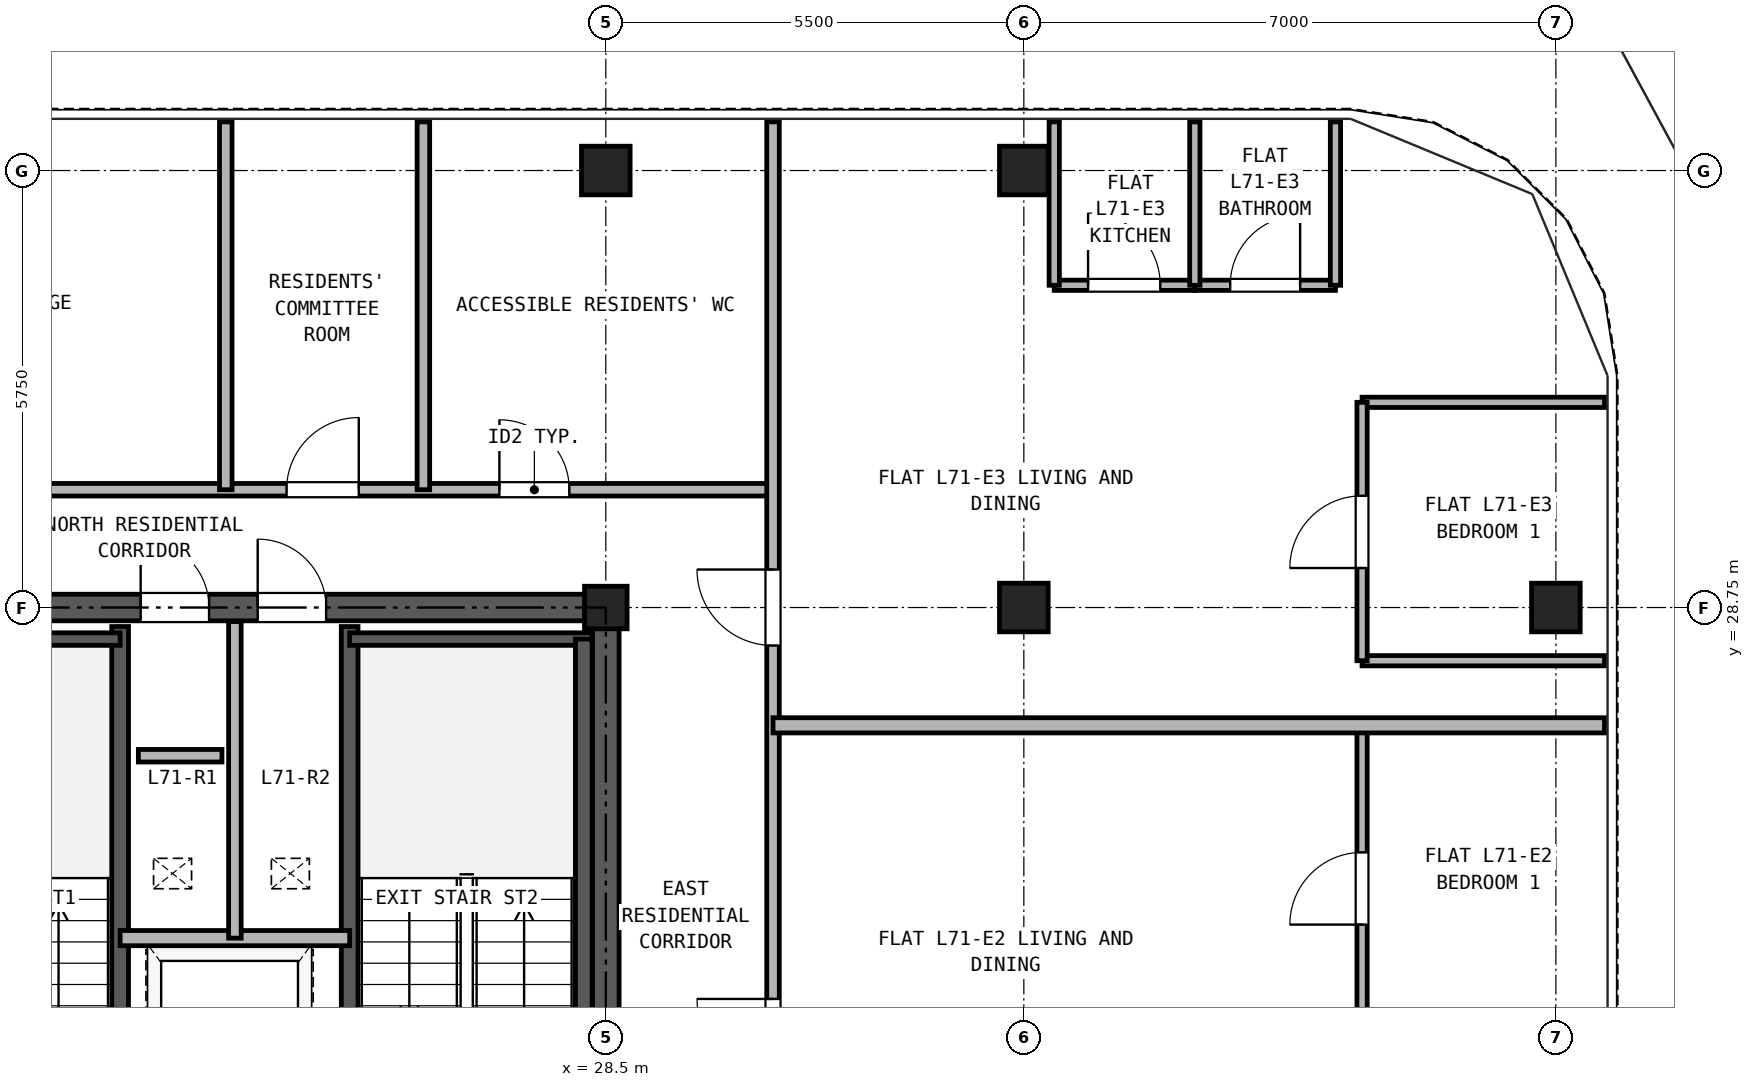
"""IFC4 building model, lengths in metres.
Left out: names, types, materials, properties, quantities, classifications, styles, units other than length and angle.
Written with IfcOpenShell. Run it as: python <this file> out.ifc"""

import sys

from ifc_helpers import new_model, si_unit, direction, frame, frame_2d, origin, origin_2d, place, context, subcontext, project, spatial, rectangle, hollow_rectangle, extrude, source, transform, mapped, element, fill, save


model = new_model("IFC4")
c1 = context("Model", 3, precision=1e-05, world=origin(), true_north=direction((0.0, 1.0)))
c2 = subcontext(c1, "Body", "Model", "MODEL_VIEW")
j1 = project(units=[si_unit("LENGTHUNIT", "METRE"), si_unit("PLANEANGLEUNIT", "RADIAN")], contexts=[c1])
p1 = place(None, origin())
s1 = spatial("IfcSite", under=j1, at=p1, CompositionType="ELEMENT")
p2 = place(p1, origin())
s2 = spatial("IfcBuilding", under=s1, at=p2, CompositionType="ELEMENT")
p3 = place(p2, frame((0.0, 0.0, 248.9)))
s3 = spatial("IfcBuildingStorey", under=s2, at=p3, CompositionType="ELEMENT", Elevation=248.9)
m1 = source(origin(), c2, "Body", "SweptSolid", [
    extrude(hollow_rectangle(XDim=0.64, YDim=0.64, WallThickness=0.035, at=origin_2d()), origin(), (0.0, 0.0, 1.0), 2.98),
])
for number, where, z_axis, x_axis in (
    (1, (28.5, 34.5, 0.0), (0.0, 0.0, 1.0), (1.0, 0.0, 0.0)),
    (2, (34.0, 34.5, 0.0), (0.0, 0.0, 1.0), (1.0, 0.0, 0.0)),
    (3, (41.0, 28.75, 0.0), (0.0, 0.0, 1.0), (1.0, 0.0, 0.0)),
):
    element("IfcColumn", number, at=place(p3, frame(where, z_axis=z_axis, x_axis=x_axis)), inside=s3, PredefinedType="COLUMN", context=c2, shape_type="MappedRepresentation", body=[
        mapped(m1, transform((0.0, 0.0, 0.0), x_axis=(1.0, 0.0, 0.0), y_axis=(0.0, 1.0, 0.0), z_axis=(0.0, 0.0, 1.0), scale=1.0)),
    ])
m2 = source(origin(), c2, "Body", "SweptSolid", [
    extrude(hollow_rectangle(XDim=0.56, YDim=0.56, WallThickness=0.03, at=origin_2d()), origin(), (0.0, 0.0, 1.0), 2.98),
])
p4 = place(p3, frame((28.5, 28.75, 0.0), z_axis=(0.0, 0.0, 1.0), x_axis=(1.0, 0.0, 0.0)))
e4 = element("IfcColumn", 4, at=p4, inside=s3, PredefinedType="COLUMN", context=c2, shape_type="MappedRepresentation", body=[
    mapped(m2, transform((0.0, 0.0, 0.0), x_axis=(1.0, 0.0, 0.0), y_axis=(0.0, 1.0, 0.0), z_axis=(0.0, 0.0, 1.0), scale=1.0)),
])
p5 = place(p3, frame((34.0, 28.75, 0.0), z_axis=(0.0, 0.0, 1.0), x_axis=(1.0, 0.0, 0.0)))
e5 = element("IfcColumn", 5, at=p5, inside=s3, PredefinedType="COLUMN", context=c2, shape_type="MappedRepresentation", body=[
    mapped(m1, transform((0.0, 0.0, 0.0), x_axis=(1.0, 0.0, 0.0), y_axis=(0.0, 1.0, 0.0), z_axis=(0.0, 0.0, 1.0), scale=1.0)),
])
p6 = place(p3, frame((18.325, 28.75, 0.0), z_axis=(0.0, 0.0, 1.0), x_axis=(1.0, 0.0, 0.0)))
e6 = element("IfcWall", 6, at=p6, inside=s3, PredefinedType="SHEAR", context=c2, shape_type="SweptSolid", body=[
    extrude(rectangle(XDim=10.35, YDim=0.35, at=frame_2d((5.175, 0.0))), origin(), (0.0, 0.0, 1.0), 2.98),
])
p7 = place(p6, frame((4.055, 0.0, 0.0)))
e7 = element("IfcOpeningElement", 7, at=p7, cuts=e6, PredefinedType="OPENING", context=c2, shape_type="SweptSolid", body=[
    extrude(rectangle(XDim=0.9, YDim=2.05, at=frame_2d((0.45, 1.025))), frame((0.0, 0.185, 0.0), z_axis=(0.0, -1.0, 0.0), x_axis=(1.0, 0.0, 0.0)), (0.0, 0.0, 1.0), 0.37),
])
p8 = place(p6, frame((5.595, 0.0, 0.0)))
e8 = element("IfcOpeningElement", 8, at=p8, cuts=e6, PredefinedType="OPENING", context=c2, shape_type="SweptSolid", body=[
    extrude(rectangle(XDim=0.9, YDim=2.05, at=frame_2d((0.45, 1.025))), frame((0.0, 0.185, 0.0), z_axis=(0.0, -1.0, 0.0), x_axis=(1.0, 0.0, 0.0)), (0.0, 0.0, 1.0), 0.37),
])
p9 = place(p3, frame((28.5, 11.675, 0.0), z_axis=(0.0, 0.0, 1.0), x_axis=(0.0, 1.0, 0.0)))
e9 = element("IfcWall", 9, at=p9, inside=s3, PredefinedType="SHEAR", context=c2, shape_type="SweptSolid", body=[
    extrude(rectangle(XDim=16.9, YDim=0.35, at=frame_2d((8.45, 0.0))), origin(), (0.0, 0.0, 1.0), 2.98),
])
p10 = place(p9, frame((7.475, 0.0, 0.0)))
e10 = element("IfcOpeningElement", 10, at=p10, cuts=e9, PredefinedType="OPENING", context=c2, shape_type="SweptSolid", body=[
    extrude(rectangle(XDim=1.15, YDim=2.2, at=frame_2d((0.575, 1.1))), frame((0.0, 0.185, 0.0), z_axis=(0.0, -1.0, 0.0), x_axis=(1.0, 0.0, 0.0)), (0.0, 0.0, 1.0), 0.37),
])
for number, where, z_axis, x_axis in (
    (11, (22.11, 21.39, 0.0), (0.0, 0.0, 1.0), (0.0, 1.0, 0.0)),
    (12, (25.13, 21.39, 0.0), (0.0, 0.0, 1.0), (0.0, 1.0, 0.0)),
):
    element("IfcWall", number, at=place(p3, frame(where, z_axis=z_axis, x_axis=x_axis)), inside=s3, PredefinedType="SOLIDWALL", context=c2, shape_type="SweptSolid", body=[
        extrude(rectangle(XDim=7.11, YDim=0.22, at=frame_2d((3.555, 0.0))), origin(), (0.0, 0.0, 1.0), 2.98),
    ])
p11 = place(p3, frame((18.685, 28.335, 0.0), z_axis=(0.0, 0.0, 1.0), x_axis=(1.0, 0.0, 0.0)))
e13 = element("IfcWall", 13, at=p11, inside=s3, PredefinedType="PARTITIONING", context=c2, shape_type="SweptSolid", body=[
    extrude(rectangle(XDim=3.425, YDim=0.165, at=frame_2d((1.712, 0.0))), origin(), (0.0, 0.0, 1.0), 2.98),
])
p12 = place(p3, frame((25.13, 28.335, 0.0), z_axis=(0.0, 0.0, 1.0), x_axis=(1.0, 0.0, 0.0)))
e14 = element("IfcWall", 14, at=p12, inside=s3, PredefinedType="PARTITIONING", context=c2, shape_type="SweptSolid", body=[
    extrude(rectangle(XDim=3.185, YDim=0.165, at=frame_2d((1.593, 0.0))), origin(), (0.0, 0.0, 1.0), 2.98),
])
p13 = place(p3, frame((28.21, 21.39, 0.0), z_axis=(0.0, 0.0, 1.0), x_axis=(0.0, 1.0, 0.0)))
e15 = element("IfcWall", 15, at=p13, inside=s3, PredefinedType="SOLIDWALL", context=c2, shape_type="SweptSolid", body=[
    extrude(rectangle(XDim=6.945, YDim=0.22, at=frame_2d((3.473, 0.0))), origin(), (0.0, 0.0, 1.0), 2.98),
])
p14 = place(p3, frame((22.11, 24.4, 0.0), z_axis=(0.0, 0.0, 1.0), x_axis=(1.0, 0.0, 0.0)))
e16 = element("IfcWall", 16, at=p14, inside=s3, PredefinedType="PARTITIONING", context=c2, shape_type="SweptSolid", body=[
    extrude(rectangle(XDim=3.02, YDim=0.2, at=frame_2d((1.51, 0.0))), origin(), (0.0, 0.0, 1.0), 2.98),
])
p15 = place(p3, frame((23.62, 24.4, 0.0), z_axis=(0.0, 0.0, 1.0), x_axis=(0.0, 1.0, 0.0)))
e17 = element("IfcWall", 17, at=p15, inside=s3, PredefinedType="PARTITIONING", context=c2, shape_type="SweptSolid", body=[
    extrude(rectangle(XDim=4.165, YDim=0.165, at=frame_2d((2.083, 0.0))), origin(), (0.0, 0.0, 1.0), 2.98),
])
p16 = place(p3, frame((16.3, 30.3, 0.0), z_axis=(0.0, 0.0, 1.0), x_axis=(1.0, 0.0, 0.0)))
e18 = element("IfcWall", 18, at=p16, inside=s3, PredefinedType="PARTITIONING", context=c2, shape_type="SweptSolid", body=[
    extrude(rectangle(XDim=14.4, YDim=0.165, at=frame_2d((7.2, 0.0))), origin(), (0.0, 0.0, 1.0), 2.98),
])
p17 = place(p16, frame((3.1, 0.0, 0.0)))
e19 = element("IfcOpeningElement", 19, at=p17, cuts=e18, PredefinedType="OPENING", context=c2, shape_type="SweptSolid", body=[
    extrude(rectangle(XDim=0.95, YDim=2.15, at=frame_2d((0.475, 1.075))), frame((0.0, 0.093, 0.0), z_axis=(0.0, -1.0, 0.0), x_axis=(1.0, 0.0, 0.0)), (0.0, 0.0, 1.0), 0.185),
])
p18 = place(p16, frame((8.0, 0.0, 0.0)))
e20 = element("IfcOpeningElement", 20, at=p18, cuts=e18, PredefinedType="OPENING", context=c2, shape_type="SweptSolid", body=[
    extrude(rectangle(XDim=0.95, YDim=2.15, at=frame_2d((0.475, 1.075))), frame((0.0, 0.093, 0.0), z_axis=(0.0, -1.0, 0.0), x_axis=(1.0, 0.0, 0.0)), (0.0, 0.0, 1.0), 0.185),
])
p19 = place(p16, frame((10.8, 0.0, 0.0)))
e21 = element("IfcOpeningElement", 21, at=p19, cuts=e18, PredefinedType="OPENING", context=c2, shape_type="SweptSolid", body=[
    extrude(rectangle(XDim=0.92, YDim=2.1, at=frame_2d((0.46, 1.05))), frame((0.0, 0.093, 0.0), z_axis=(0.0, -1.0, 0.0), x_axis=(1.0, 0.0, 0.0)), (0.0, 0.0, 1.0), 0.185),
])
p20 = place(p3, frame((30.7, 11.2, 0.0), z_axis=(0.0, 0.0, 1.0), x_axis=(0.0, 1.0, 0.0)))
e22 = element("IfcWall", 22, at=p20, inside=s3, PredefinedType="PARTITIONING", context=c2, shape_type="SweptSolid", body=[
    extrude(rectangle(XDim=23.94, YDim=0.165, at=frame_2d((11.97, 0.0))), origin(), (0.0, 0.0, 1.0), 2.98),
])
p21 = place(p20, frame((3.4, 0.0, 0.0)))
e23 = element("IfcOpeningElement", 23, at=p21, cuts=e22, PredefinedType="OPENING", context=c2, shape_type="SweptSolid", body=[
    extrude(rectangle(XDim=1.0, YDim=2.15, at=frame_2d((0.5, 1.075))), frame((0.0, 0.093, 0.0), z_axis=(0.0, -1.0, 0.0), x_axis=(1.0, 0.0, 0.0)), (0.0, 0.0, 1.0), 0.185),
])
p22 = place(p20, frame((11.4, 0.0, 0.0)))
e24 = element("IfcOpeningElement", 24, at=p22, cuts=e22, PredefinedType="OPENING", context=c2, shape_type="SweptSolid", body=[
    extrude(rectangle(XDim=1.0, YDim=2.15, at=frame_2d((0.5, 1.075))), frame((0.0, 0.093, 0.0), z_axis=(0.0, -1.0, 0.0), x_axis=(1.0, 0.0, 0.0)), (0.0, 0.0, 1.0), 0.185),
])
p23 = place(p20, frame((17.05, 0.0, 0.0)))
e25 = element("IfcOpeningElement", 25, at=p23, cuts=e22, PredefinedType="OPENING", context=c2, shape_type="SweptSolid", body=[
    extrude(rectangle(XDim=1.0, YDim=2.15, at=frame_2d((0.5, 1.075))), frame((0.0, 0.093, 0.0), z_axis=(0.0, -1.0, 0.0), x_axis=(1.0, 0.0, 0.0)), (0.0, 0.0, 1.0), 0.185),
])
p24 = place(p3, frame((38.45, 22.916, 0.0), z_axis=(0.0, 0.0, 1.0), x_axis=(0.0, 1.0, 0.0)))
e26 = element("IfcWall", 26, at=p24, inside=s3, PredefinedType="PARTITIONING", context=c2, shape_type="SweptSolid", body=[
    extrude(rectangle(XDim=4.284, YDim=0.135, at=frame_2d((2.142, 0.0))), origin(), (0.0, 0.0, 1.0), 2.98),
])
p25 = place(p24, frame((1.662, 0.0, 0.0)))
e27 = element("IfcOpeningElement", 27, at=p25, cuts=e26, PredefinedType="OPENING", context=c2, shape_type="SweptSolid", body=[
    extrude(rectangle(XDim=0.95, YDim=2.15, at=frame_2d((0.475, 1.075))), frame((0.0, 0.077, 0.0), z_axis=(0.0, -1.0, 0.0), x_axis=(1.0, 0.0, 0.0)), (0.0, 0.0, 1.0), 0.155),
])
p26 = place(p3, frame((30.7, 27.2, 0.0), z_axis=(0.0, 0.0, 1.0), x_axis=(1.0, 0.0, 0.0)))
e28 = element("IfcWall", 28, at=p26, inside=s3, PredefinedType="PARTITIONING", context=c2, shape_type="SweptSolid", body=[
    extrude(rectangle(XDim=10.94, YDim=0.2, at=frame_2d((5.47, 0.0))), origin(), (0.0, 0.0, 1.0), 2.98),
])
p27 = place(p3, frame((34.4, 32.99, 0.0), z_axis=(0.0, 0.0, 1.0), x_axis=(1.0, 0.0, 0.0)))
e29 = element("IfcWall", 29, at=p27, inside=s3, PredefinedType="PARTITIONING", context=c2, shape_type="SweptSolid", body=[
    extrude(rectangle(XDim=1.85, YDim=0.135, at=frame_2d((0.925, 0.0))), origin(), (0.0, 0.0, 1.0), 2.98),
])
p28 = place(p27, frame((0.445, 0.0, 0.0)))
e30 = element("IfcOpeningElement", 30, at=p28, cuts=e29, PredefinedType="OPENING", context=c2, shape_type="SweptSolid", body=[
    extrude(rectangle(XDim=0.95, YDim=2.15, at=frame_2d((0.475, 1.075))), frame((0.0, 0.077, 0.0), z_axis=(0.0, -1.0, 0.0), x_axis=(1.0, 0.0, 0.0)), (0.0, 0.0, 1.0), 0.155),
])
p29 = place(p3, frame((36.25, 32.99, 0.0), z_axis=(0.0, 0.0, 1.0), x_axis=(1.0, 0.0, 0.0)))
e31 = element("IfcWall", 31, at=p29, inside=s3, PredefinedType="PARTITIONING", context=c2, shape_type="SweptSolid", body=[
    extrude(rectangle(XDim=1.85, YDim=0.135, at=frame_2d((0.925, 0.0))), origin(), (0.0, 0.0, 1.0), 2.98),
])
p30 = place(p29, frame((0.465, 0.0, 0.0)))
e32 = element("IfcOpeningElement", 32, at=p30, cuts=e31, PredefinedType="OPENING", context=c2, shape_type="SweptSolid", body=[
    extrude(rectangle(XDim=0.92, YDim=2.1, at=frame_2d((0.46, 1.05))), frame((0.0, 0.077, 0.0), z_axis=(0.0, -1.0, 0.0), x_axis=(1.0, 0.0, 0.0)), (0.0, 0.0, 1.0), 0.155),
])
for number, where, z_axis, x_axis in (
    (33, (34.4, 32.99, 0.0), (0.0, 0.0, 1.0), (0.0, 1.0, 0.0)),
    (34, (36.25, 32.99, 0.0), (0.0, 0.0, 1.0), (0.0, 1.0, 0.0)),
    (35, (38.1, 32.99, 0.0), (0.0, 0.0, 1.0), (0.0, 1.0, 0.0)),
):
    element("IfcWall", number, at=place(p3, frame(where, z_axis=z_axis, x_axis=x_axis)), inside=s3, PredefinedType="PARTITIONING", context=c2, shape_type="SweptSolid", body=[
        extrude(rectangle(XDim=2.15, YDim=0.135, at=frame_2d((1.075, 0.0))), origin(), (0.0, 0.0, 1.0), 2.98),
    ])
for number, where, z_axis, x_axis in (
    (36, (38.45, 28.05, 0.0), (0.0, 0.0, 1.0), (1.0, 0.0, 0.0)),
    (37, (38.45, 31.45, 0.0), (0.0, 0.0, 1.0), (1.0, 0.0, 0.0)),
):
    element("IfcWall", number, at=place(p3, frame(where, z_axis=z_axis, x_axis=x_axis)), inside=s3, PredefinedType="PARTITIONING", context=c2, shape_type="SweptSolid", body=[
        extrude(rectangle(XDim=3.19, YDim=0.135, at=frame_2d((1.595, 0.0))), origin(), (0.0, 0.0, 1.0), 2.98),
    ])
p31 = place(p3, frame((38.45, 28.05, 0.0), z_axis=(0.0, 0.0, 1.0), x_axis=(0.0, 1.0, 0.0)))
e38 = element("IfcWall", 38, at=p31, inside=s3, PredefinedType="PARTITIONING", context=c2, shape_type="SweptSolid", body=[
    extrude(rectangle(XDim=3.4, YDim=0.135, at=frame_2d((1.7, 0.0))), origin(), (0.0, 0.0, 1.0), 2.98),
])
p32 = place(p31, frame((1.22, 0.0, 0.0)))
e39 = element("IfcOpeningElement", 39, at=p32, cuts=e38, PredefinedType="OPENING", context=c2, shape_type="SweptSolid", body=[
    extrude(rectangle(XDim=0.95, YDim=2.15, at=frame_2d((0.475, 1.075))), frame((0.0, 0.077, 0.0), z_axis=(0.0, -1.0, 0.0), x_axis=(1.0, 0.0, 0.0)), (0.0, 0.0, 1.0), 0.155),
])
for number, where, z_axis, x_axis in (
    (40, (23.5, 30.3, 0.0), (0.0, 0.0, 1.0), (0.0, 1.0, 0.0)),
    (41, (26.1, 30.3, 0.0), (0.0, 0.0, 1.0), (0.0, 1.0, 0.0)),
):
    element("IfcWall", number, at=place(p3, frame(where, z_axis=z_axis, x_axis=x_axis)), inside=s3, PredefinedType="PARTITIONING", context=c2, shape_type="SweptSolid", body=[
        extrude(rectangle(XDim=4.84, YDim=0.165, at=frame_2d((2.42, 0.0))), origin(), (0.0, 0.0, 1.0), 2.98),
    ])
p33 = place(p3, frame((22.35, 26.8, 0.0), z_axis=(0.0, 0.0, 1.0), x_axis=(1.0, 0.0, 0.0)))
e42 = element("IfcWall", 42, at=p33, inside=s3, PredefinedType="PARTITIONING", context=c2, shape_type="SweptSolid", body=[
    extrude(rectangle(XDim=1.1, YDim=0.165, at=frame_2d((0.55, 0.0))), origin(), (0.0, 0.0, 1.0), 2.98),
])
p34 = place(p7, origin())
e43 = element("IfcDoor", 43, at=p34, inside=s3, OperationType="SINGLE_SWING_LEFT", PredefinedType="DOOR", context=c2, shape_type="SweptSolid", body=[
    extrude(rectangle(XDim=0.9, YDim=2.05, at=frame_2d((0.45, 1.025))), frame((0.0, 0.025, 0.0), z_axis=(0.0, -1.0, 0.0), x_axis=(1.0, 0.0, 0.0)), (0.0, 0.0, 1.0), 0.05),
])
fill(e7, e43)
p35 = place(p8, origin())
e44 = element("IfcDoor", 44, at=p35, inside=s3, OperationType="SINGLE_SWING_LEFT", PredefinedType="DOOR", context=c2, shape_type="SweptSolid", body=[
    extrude(rectangle(XDim=0.9, YDim=2.05, at=frame_2d((0.45, 1.025))), frame((0.0, 0.025, 0.0), z_axis=(0.0, -1.0, 0.0), x_axis=(1.0, 0.0, 0.0)), (0.0, 0.0, 1.0), 0.05),
])
fill(e8, e44)
p36 = place(p25, frame((0.95, 0.0, 0.0), z_axis=(0.0, 0.0, 1.0), x_axis=(-1.0, 0.0, 0.0)))
e45 = element("IfcDoor", 45, at=p36, inside=s3, OperationType="SINGLE_SWING_LEFT", PredefinedType="DOOR", context=c2, shape_type="SweptSolid", body=[
    extrude(rectangle(XDim=0.95, YDim=2.15, at=frame_2d((0.475, 1.075))), frame((0.0, 0.025, 0.0), z_axis=(0.0, -1.0, 0.0), x_axis=(1.0, 0.0, 0.0)), (0.0, 0.0, 1.0), 0.05),
])
fill(e27, e45)
p37 = place(p22, frame((1.0, 0.0, 0.0), z_axis=(0.0, 0.0, 1.0), x_axis=(-1.0, 0.0, 0.0)))
e46 = element("IfcDoor", 46, at=p37, inside=s3, OperationType="SINGLE_SWING_RIGHT", PredefinedType="DOOR", context=c2, shape_type="SweptSolid", body=[
    extrude(rectangle(XDim=1.0, YDim=2.15, at=frame_2d((0.5, 1.075))), frame((0.0, 0.025, 0.0), z_axis=(0.0, -1.0, 0.0), x_axis=(1.0, 0.0, 0.0)), (0.0, 0.0, 1.0), 0.05),
])
fill(e24, e46)
p38 = place(p28, frame((0.95, 0.0, 0.0), z_axis=(0.0, 0.0, 1.0), x_axis=(-1.0, 0.0, 0.0)))
e47 = element("IfcDoor", 47, at=p38, inside=s3, OperationType="SINGLE_SWING_LEFT", PredefinedType="DOOR", context=c2, shape_type="SweptSolid", body=[
    extrude(rectangle(XDim=0.95, YDim=2.15, at=frame_2d((0.475, 1.075))), frame((0.0, 0.025, 0.0), z_axis=(0.0, -1.0, 0.0), x_axis=(1.0, 0.0, 0.0)), (0.0, 0.0, 1.0), 0.05),
])
fill(e30, e47)
p39 = place(p30, frame((0.92, 0.0, 0.0), z_axis=(0.0, 0.0, 1.0), x_axis=(-1.0, 0.0, 0.0)))
e48 = element("IfcDoor", 48, at=p39, inside=s3, OperationType="SINGLE_SWING_RIGHT", PredefinedType="DOOR", context=c2, shape_type="SweptSolid", body=[
    extrude(rectangle(XDim=0.92, YDim=2.1, at=frame_2d((0.46, 1.05))), frame((0.0, 0.025, 0.0), z_axis=(0.0, -1.0, 0.0), x_axis=(1.0, 0.0, 0.0)), (0.0, 0.0, 1.0), 0.05),
])
fill(e32, e48)
p40 = place(p32, frame((0.95, 0.0, 0.0), z_axis=(0.0, 0.0, 1.0), x_axis=(-1.0, 0.0, 0.0)))
e49 = element("IfcDoor", 49, at=p40, inside=s3, OperationType="SINGLE_SWING_LEFT", PredefinedType="DOOR", context=c2, shape_type="SweptSolid", body=[
    extrude(rectangle(XDim=0.95, YDim=2.15, at=frame_2d((0.475, 1.075))), frame((0.0, 0.025, 0.0), z_axis=(0.0, -1.0, 0.0), x_axis=(1.0, 0.0, 0.0)), (0.0, 0.0, 1.0), 0.05),
])
fill(e39, e49)
p41 = place(p23, frame((1.0, 0.0, 0.0), z_axis=(0.0, 0.0, 1.0), x_axis=(-1.0, 0.0, 0.0)))
e50 = element("IfcDoor", 50, at=p41, inside=s3, OperationType="SINGLE_SWING_RIGHT", PredefinedType="DOOR", context=c2, shape_type="SweptSolid", body=[
    extrude(rectangle(XDim=1.0, YDim=2.15, at=frame_2d((0.5, 1.075))), frame((0.0, 0.025, 0.0), z_axis=(0.0, -1.0, 0.0), x_axis=(1.0, 0.0, 0.0)), (0.0, 0.0, 1.0), 0.05),
])
fill(e25, e50)
p42 = place(p18, origin())
e51 = element("IfcDoor", 51, at=p42, inside=s3, OperationType="SINGLE_SWING_RIGHT", PredefinedType="DOOR", context=c2, shape_type="SweptSolid", body=[
    extrude(rectangle(XDim=0.95, YDim=2.15, at=frame_2d((0.475, 1.075))), frame((0.0, 0.025, 0.0), z_axis=(0.0, -1.0, 0.0), x_axis=(1.0, 0.0, 0.0)), (0.0, 0.0, 1.0), 0.05),
])
fill(e20, e51)
p43 = place(p19, origin())
e52 = element("IfcDoor", 52, at=p43, inside=s3, OperationType="SINGLE_SWING_LEFT", PredefinedType="DOOR", context=c2, shape_type="SweptSolid", body=[
    extrude(rectangle(XDim=0.92, YDim=2.1, at=frame_2d((0.46, 1.05))), frame((0.0, 0.025, 0.0), z_axis=(0.0, -1.0, 0.0), x_axis=(1.0, 0.0, 0.0)), (0.0, 0.0, 1.0), 0.05),
])
fill(e21, e52)
save(model, sys.argv[1])
